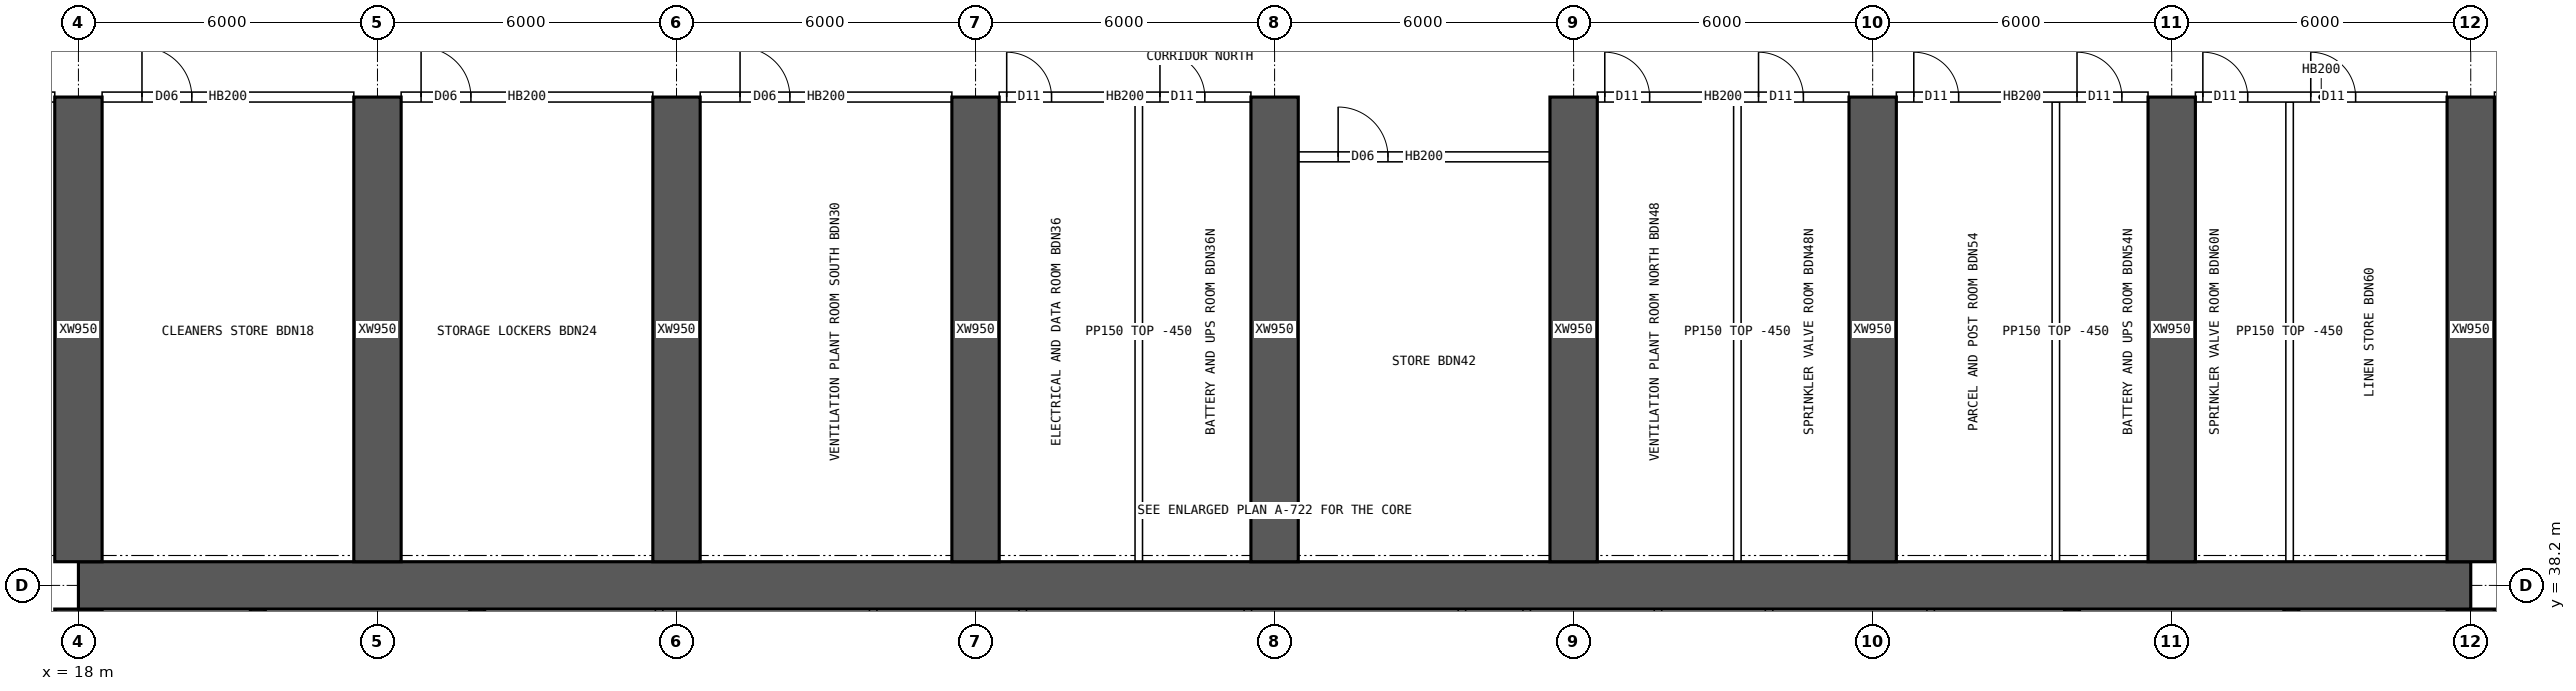
"""IFC4 building model, lengths in metres.
Left out: names, types, materials, properties, quantities, classifications, styles, units other than length and angle.
Written with IfcOpenShell. Run it as: python <this file> out.ifc"""

import sys

from ifc_helpers import new_model, si_unit, direction, frame, frame_2d, origin, place, context, subcontext, project, spatial, rectangle, extrude, element, fill, save


model = new_model("IFC4")
c1 = context("Model", 3, precision=1e-05, world=origin(), true_north=direction((0.0, 1.0)))
c2 = subcontext(c1, "Body", "Model", "MODEL_VIEW")
j1 = project(units=[si_unit("LENGTHUNIT", "METRE"), si_unit("PLANEANGLEUNIT", "RADIAN")], contexts=[c1])
p1 = place(None, origin())
s1 = spatial("IfcSite", under=j1, at=p1, CompositionType="ELEMENT")
p2 = place(p1, origin())
s2 = spatial("IfcBuilding", under=s1, at=p2, CompositionType="ELEMENT")
p3 = place(p2, frame((0.0, 0.0, 80.65)))
s3 = spatial("IfcBuildingStorey", under=s2, at=p3, CompositionType="ELEMENT", Elevation=80.65)
p4 = place(p3, frame((18.0, 38.2, 0.0), z_axis=(0.0, 0.0, 1.0), x_axis=(1.0, 0.0, 0.0)))
e1 = element("IfcWall", 1, at=p4, inside=s3, PredefinedType="SHEAR", context=c2, shape_type="SweptSolid", body=[
    extrude(rectangle(XDim=48.0, YDim=0.95, at=frame_2d((24.0, 0.0))), origin(), (0.0, 0.0, 1.0), 3.75),
])
p5 = place(p3, frame((18.0, 26.275, 0.0), z_axis=(0.0, 0.0, 1.0), x_axis=(0.0, 1.0, 0.0)))
e2 = element("IfcWall", 2, at=p5, inside=s3, PredefinedType="SHEAR", context=c2, shape_type="SweptSolid", body=[
    extrude(rectangle(XDim=11.45, YDim=0.95, at=frame_2d((5.725, 0.0))), origin(), (0.0, 0.0, 1.0), 3.75),
])
p6 = place(p5, frame((5.025, 0.0, 0.0)))
e3 = element("IfcOpeningElement", 3, at=p6, cuts=e2, PredefinedType="OPENING", context=c2, shape_type="SweptSolid", body=[
    extrude(rectangle(XDim=1.2, YDim=2.1, at=frame_2d((0.6, 1.05))), frame((0.0, 0.485, 0.0), z_axis=(0.0, -1.0, 0.0), x_axis=(1.0, 0.0, 0.0)), (0.0, 0.0, 1.0), 0.97),
])
p7 = place(p3, frame((66.0, 26.275, 0.0), z_axis=(0.0, 0.0, 1.0), x_axis=(0.0, 1.0, 0.0)))
e4 = element("IfcWall", 4, at=p7, inside=s3, PredefinedType="SHEAR", context=c2, shape_type="SweptSolid", body=[
    extrude(rectangle(XDim=11.45, YDim=0.95, at=frame_2d((5.725, 0.0))), origin(), (0.0, 0.0, 1.0), 3.75),
])
p8 = place(p7, frame((5.025, 0.0, 0.0)))
e5 = element("IfcOpeningElement", 5, at=p8, cuts=e4, PredefinedType="OPENING", context=c2, shape_type="SweptSolid", body=[
    extrude(rectangle(XDim=1.2, YDim=2.1, at=frame_2d((0.6, 1.05))), frame((0.0, 0.485, 0.0), z_axis=(0.0, -1.0, 0.0), x_axis=(1.0, 0.0, 0.0)), (0.0, 0.0, 1.0), 0.97),
])
for number, where, z_axis, x_axis in (
    (6, (21.6, 34.75, 0.0), (0.0, 0.0, 1.0), (0.0, 1.0, 0.0)),
    (7, (62.4, 34.75, 0.0), (0.0, 0.0, 1.0), (0.0, 1.0, 0.0)),
    (8, (26.0, 34.75, 0.0), (0.0, 0.0, 1.0), (0.0, 1.0, 0.0)),
    (9, (58.0, 34.75, 0.0), (0.0, 0.0, 1.0), (0.0, 1.0, 0.0)),
):
    element("IfcWall", number, at=place(p3, frame(where, z_axis=z_axis, x_axis=x_axis)), inside=s3, PredefinedType="SHEAR", context=c2, shape_type="SweptSolid", body=[
        extrude(rectangle(XDim=2.975, YDim=0.3, at=frame_2d((1.488, 0.0))), origin(), (0.0, 0.0, 1.0), 3.75),
    ])
for number, where, z_axis, x_axis in (
    (10, (18.0, 38.675, 0.0), (0.0, 0.0, 1.0), (0.0, 1.0, 0.0)),
    (11, (24.0, 38.675, 0.0), (0.0, 0.0, 1.0), (0.0, 1.0, 0.0)),
    (12, (30.0, 38.675, 0.0), (0.0, 0.0, 1.0), (0.0, 1.0, 0.0)),
    (13, (36.0, 38.675, 0.0), (0.0, 0.0, 1.0), (0.0, 1.0, 0.0)),
    (14, (42.0, 38.675, 0.0), (0.0, 0.0, 1.0), (0.0, 1.0, 0.0)),
    (15, (48.0, 38.675, 0.0), (0.0, 0.0, 1.0), (0.0, 1.0, 0.0)),
    (16, (54.0, 38.675, 0.0), (0.0, 0.0, 1.0), (0.0, 1.0, 0.0)),
    (17, (60.0, 38.675, 0.0), (0.0, 0.0, 1.0), (0.0, 1.0, 0.0)),
    (18, (66.0, 38.675, 0.0), (0.0, 0.0, 1.0), (0.0, 1.0, 0.0)),
):
    element("IfcWall", number, at=place(p3, frame(where, z_axis=z_axis, x_axis=x_axis)), inside=s3, PredefinedType="SHEAR", context=c2, shape_type="SweptSolid", body=[
        extrude(rectangle(XDim=9.325, YDim=0.95, at=frame_2d((4.663, 0.0))), origin(), (0.0, 0.0, 1.0), 3.75),
    ])
for number, where, z_axis, x_axis in (
    (19, (29.651, 34.75, 0.0), (0.0, 0.0, 1.0), (0.0, 1.0, 0.0)),
    (20, (33.946, 34.75, 0.0), (0.0, 0.0, 1.0), (0.0, 1.0, 0.0)),
    (21, (36.946, 34.75, 0.0), (0.0, 0.0, 1.0), (0.0, 1.0, 0.0)),
    (22, (41.463, 34.75, 0.0), (0.0, 0.0, 1.0), (0.0, 1.0, 0.0)),
    (23, (45.758, 34.75, 0.0), (0.0, 0.0, 1.0), (0.0, 1.0, 0.0)),
    (24, (47.058, 34.75, 0.0), (0.0, 0.0, 1.0), (0.0, 1.0, 0.0)),
    (25, (49.692, 34.75, 0.0), (0.0, 0.0, 1.0), (0.0, 1.0, 0.0)),
    (26, (51.921, 34.75, 0.0), (0.0, 0.0, 1.0), (0.0, 1.0, 0.0)),
    (27, (55.163, 34.75, 0.0), (0.0, 0.0, 1.0), (0.0, 1.0, 0.0)),
):
    element("IfcWall", number, at=place(p3, frame(where, z_axis=z_axis, x_axis=x_axis)), inside=s3, PredefinedType="SOLIDWALL", context=c2, shape_type="SweptSolid", body=[
        extrude(rectangle(XDim=2.975, YDim=0.15, at=frame_2d((1.488, 0.0))), origin(), (0.0, 0.0, 1.0), 3.3),
    ])
p9 = place(p3, frame((12.475, 48.0, 0.0), z_axis=(0.0, 0.0, 1.0), x_axis=(1.0, 0.0, 0.0)))
e28 = element("IfcWall", 28, at=p9, inside=s3, PredefinedType="SOLIDWALL", context=c2, shape_type="SweptSolid", body=[
    extrude(rectangle(XDim=5.05, YDim=0.2, at=frame_2d((2.525, 0.0))), origin(), (0.0, 0.0, 1.0), 3.3),
])
p10 = place(p9, frame((3.325, 0.0, 0.0)))
e29 = element("IfcOpeningElement", 29, at=p10, cuts=e28, PredefinedType="OPENING", context=c2, shape_type="SweptSolid", body=[
    extrude(rectangle(XDim=1.6, YDim=2.1, at=frame_2d((0.8, 1.05))), frame((0.0, 0.11, 0.0), z_axis=(0.0, -1.0, 0.0), x_axis=(1.0, 0.0, 0.0)), (0.0, 0.0, 1.0), 0.22),
])
p11 = place(p3, frame((18.475, 48.0, 0.0), z_axis=(0.0, 0.0, 1.0), x_axis=(1.0, 0.0, 0.0)))
e30 = element("IfcWall", 30, at=p11, inside=s3, PredefinedType="SOLIDWALL", context=c2, shape_type="SweptSolid", body=[
    extrude(rectangle(XDim=5.05, YDim=0.2, at=frame_2d((2.525, 0.0))), origin(), (0.0, 0.0, 1.0), 3.3),
])
p12 = place(p11, frame((0.8, 0.0, 0.0)))
e31 = element("IfcOpeningElement", 31, at=p12, cuts=e30, PredefinedType="OPENING", context=c2, shape_type="SweptSolid", body=[
    extrude(rectangle(XDim=1.0, YDim=2.1, at=frame_2d((0.5, 1.05))), frame((0.0, 0.11, 0.0), z_axis=(0.0, -1.0, 0.0), x_axis=(1.0, 0.0, 0.0)), (0.0, 0.0, 1.0), 0.22),
])
p13 = place(p3, frame((24.475, 48.0, 0.0), z_axis=(0.0, 0.0, 1.0), x_axis=(1.0, 0.0, 0.0)))
e32 = element("IfcWall", 32, at=p13, inside=s3, PredefinedType="SOLIDWALL", context=c2, shape_type="SweptSolid", body=[
    extrude(rectangle(XDim=5.05, YDim=0.2, at=frame_2d((2.525, 0.0))), origin(), (0.0, 0.0, 1.0), 3.3),
])
p14 = place(p13, frame((0.4, 0.0, 0.0)))
e33 = element("IfcOpeningElement", 33, at=p14, cuts=e32, PredefinedType="OPENING", context=c2, shape_type="SweptSolid", body=[
    extrude(rectangle(XDim=1.0, YDim=2.1, at=frame_2d((0.5, 1.05))), frame((0.0, 0.11, 0.0), z_axis=(0.0, -1.0, 0.0), x_axis=(1.0, 0.0, 0.0)), (0.0, 0.0, 1.0), 0.22),
])
p15 = place(p3, frame((30.475, 48.0, 0.0), z_axis=(0.0, 0.0, 1.0), x_axis=(1.0, 0.0, 0.0)))
e34 = element("IfcWall", 34, at=p15, inside=s3, PredefinedType="SOLIDWALL", context=c2, shape_type="SweptSolid", body=[
    extrude(rectangle(XDim=5.05, YDim=0.2, at=frame_2d((2.525, 0.0))), origin(), (0.0, 0.0, 1.0), 3.3),
])
p16 = place(p15, frame((0.8, 0.0, 0.0)))
e35 = element("IfcOpeningElement", 35, at=p16, cuts=e34, PredefinedType="OPENING", context=c2, shape_type="SweptSolid", body=[
    extrude(rectangle(XDim=1.0, YDim=2.1, at=frame_2d((0.5, 1.05))), frame((0.0, 0.11, 0.0), z_axis=(0.0, -1.0, 0.0), x_axis=(1.0, 0.0, 0.0)), (0.0, 0.0, 1.0), 0.22),
])
p17 = place(p3, frame((36.475, 48.0, 0.0), z_axis=(0.0, 0.0, 1.0), x_axis=(1.0, 0.0, 0.0)))
e36 = element("IfcWall", 36, at=p17, inside=s3, PredefinedType="SOLIDWALL", context=c2, shape_type="SweptSolid", body=[
    extrude(rectangle(XDim=5.05, YDim=0.2, at=frame_2d((2.525, 0.0))), origin(), (0.0, 0.0, 1.0), 3.3),
])
p18 = place(p17, frame((0.15, 0.0, 0.0)))
e37 = element("IfcOpeningElement", 37, at=p18, cuts=e36, PredefinedType="OPENING", context=c2, shape_type="SweptSolid", body=[
    extrude(rectangle(XDim=0.9, YDim=2.1, at=frame_2d((0.45, 1.05))), frame((0.0, 0.11, 0.0), z_axis=(0.0, -1.0, 0.0), x_axis=(1.0, 0.0, 0.0)), (0.0, 0.0, 1.0), 0.22),
])
p19 = place(p17, frame((3.225, 0.0, 0.0)))
e38 = element("IfcOpeningElement", 38, at=p19, cuts=e36, PredefinedType="OPENING", context=c2, shape_type="SweptSolid", body=[
    extrude(rectangle(XDim=0.9, YDim=2.1, at=frame_2d((0.45, 1.05))), frame((0.0, 0.11, 0.0), z_axis=(0.0, -1.0, 0.0), x_axis=(1.0, 0.0, 0.0)), (0.0, 0.0, 1.0), 0.22),
])
p20 = place(p3, frame((48.475, 48.0, 0.0), z_axis=(0.0, 0.0, 1.0), x_axis=(1.0, 0.0, 0.0)))
e39 = element("IfcWall", 39, at=p20, inside=s3, PredefinedType="SOLIDWALL", context=c2, shape_type="SweptSolid", body=[
    extrude(rectangle(XDim=5.05, YDim=0.2, at=frame_2d((2.525, 0.0))), origin(), (0.0, 0.0, 1.0), 3.3),
])
p21 = place(p20, frame((0.15, 0.0, 0.0)))
e40 = element("IfcOpeningElement", 40, at=p21, cuts=e39, PredefinedType="OPENING", context=c2, shape_type="SweptSolid", body=[
    extrude(rectangle(XDim=0.9, YDim=2.1, at=frame_2d((0.45, 1.05))), frame((0.0, 0.11, 0.0), z_axis=(0.0, -1.0, 0.0), x_axis=(1.0, 0.0, 0.0)), (0.0, 0.0, 1.0), 0.22),
])
p22 = place(p20, frame((3.235, 0.0, 0.0)))
e41 = element("IfcOpeningElement", 41, at=p22, cuts=e39, PredefinedType="OPENING", context=c2, shape_type="SweptSolid", body=[
    extrude(rectangle(XDim=0.9, YDim=2.1, at=frame_2d((0.45, 1.05))), frame((0.0, 0.11, 0.0), z_axis=(0.0, -1.0, 0.0), x_axis=(1.0, 0.0, 0.0)), (0.0, 0.0, 1.0), 0.22),
])
p23 = place(p3, frame((54.475, 48.0, 0.0), z_axis=(0.0, 0.0, 1.0), x_axis=(1.0, 0.0, 0.0)))
e42 = element("IfcWall", 42, at=p23, inside=s3, PredefinedType="SOLIDWALL", context=c2, shape_type="SweptSolid", body=[
    extrude(rectangle(XDim=5.05, YDim=0.2, at=frame_2d((2.525, 0.0))), origin(), (0.0, 0.0, 1.0), 3.3),
])
p24 = place(p23, frame((0.35, 0.0, 0.0)))
e43 = element("IfcOpeningElement", 43, at=p24, cuts=e42, PredefinedType="OPENING", context=c2, shape_type="SweptSolid", body=[
    extrude(rectangle(XDim=0.9, YDim=2.1, at=frame_2d((0.45, 1.05))), frame((0.0, 0.11, 0.0), z_axis=(0.0, -1.0, 0.0), x_axis=(1.0, 0.0, 0.0)), (0.0, 0.0, 1.0), 0.22),
])
p25 = place(p23, frame((3.625, 0.0, 0.0)))
e44 = element("IfcOpeningElement", 44, at=p25, cuts=e42, PredefinedType="OPENING", context=c2, shape_type="SweptSolid", body=[
    extrude(rectangle(XDim=0.9, YDim=2.1, at=frame_2d((0.45, 1.05))), frame((0.0, 0.11, 0.0), z_axis=(0.0, -1.0, 0.0), x_axis=(1.0, 0.0, 0.0)), (0.0, 0.0, 1.0), 0.22),
])
p26 = place(p3, frame((60.475, 48.0, 0.0), z_axis=(0.0, 0.0, 1.0), x_axis=(1.0, 0.0, 0.0)))
e45 = element("IfcWall", 45, at=p26, inside=s3, PredefinedType="SOLIDWALL", context=c2, shape_type="SweptSolid", body=[
    extrude(rectangle(XDim=5.05, YDim=0.2, at=frame_2d((2.525, 0.0))), origin(), (0.0, 0.0, 1.0), 3.3),
])
p27 = place(p26, frame((0.15, 0.0, 0.0)))
e46 = element("IfcOpeningElement", 46, at=p27, cuts=e45, PredefinedType="OPENING", context=c2, shape_type="SweptSolid", body=[
    extrude(rectangle(XDim=0.9, YDim=2.1, at=frame_2d((0.45, 1.05))), frame((0.0, 0.11, 0.0), z_axis=(0.0, -1.0, 0.0), x_axis=(1.0, 0.0, 0.0)), (0.0, 0.0, 1.0), 0.22),
])
p28 = place(p26, frame((2.315, 0.0, 0.0)))
e47 = element("IfcOpeningElement", 47, at=p28, cuts=e45, PredefinedType="OPENING", context=c2, shape_type="SweptSolid", body=[
    extrude(rectangle(XDim=0.9, YDim=2.1, at=frame_2d((0.45, 1.05))), frame((0.0, 0.11, 0.0), z_axis=(0.0, -1.0, 0.0), x_axis=(1.0, 0.0, 0.0)), (0.0, 0.0, 1.0), 0.22),
])
p29 = place(p3, frame((66.475, 48.0, 0.0), z_axis=(0.0, 0.0, 1.0), x_axis=(1.0, 0.0, 0.0)))
e48 = element("IfcWall", 48, at=p29, inside=s3, PredefinedType="SOLIDWALL", context=c2, shape_type="SweptSolid", body=[
    extrude(rectangle(XDim=1.925, YDim=0.2, at=frame_2d((0.962, 0.0))), origin(), (0.0, 0.0, 1.0), 3.3),
])
p30 = place(p29, frame((0.05, 0.0, 0.0)))
e49 = element("IfcOpeningElement", 49, at=p30, cuts=e48, PredefinedType="OPENING", context=c2, shape_type="SweptSolid", body=[
    extrude(rectangle(XDim=1.2, YDim=2.1, at=frame_2d((0.6, 1.05))), frame((0.0, 0.11, 0.0), z_axis=(0.0, -1.0, 0.0), x_axis=(1.0, 0.0, 0.0)), (0.0, 0.0, 1.0), 0.22),
])
p31 = place(p3, frame((39.275, 38.675, 0.0), z_axis=(0.0, 0.0, 1.0), x_axis=(0.0, 1.0, 0.0)))
e50 = element("IfcWall", 50, at=p31, inside=s3, PredefinedType="PARTITIONING", context=c2, shape_type="SweptSolid", body=[
    extrude(rectangle(XDim=9.225, YDim=0.15, at=frame_2d((4.612, 0.0))), origin(), (0.0, 0.0, 1.0), 3.3),
])
p32 = place(p3, frame((42.475, 46.8, 0.0), z_axis=(0.0, 0.0, 1.0), x_axis=(1.0, 0.0, 0.0)))
e51 = element("IfcWall", 51, at=p32, inside=s3, PredefinedType="SOLIDWALL", context=c2, shape_type="SweptSolid", body=[
    extrude(rectangle(XDim=5.05, YDim=0.2, at=frame_2d((2.525, 0.0))), origin(), (0.0, 0.0, 1.0), 3.3),
])
p33 = place(p32, frame((0.8, 0.0, 0.0)))
e52 = element("IfcOpeningElement", 52, at=p33, cuts=e51, PredefinedType="OPENING", context=c2, shape_type="SweptSolid", body=[
    extrude(rectangle(XDim=1.0, YDim=2.1, at=frame_2d((0.5, 1.05))), frame((0.0, 0.11, 0.0), z_axis=(0.0, -1.0, 0.0), x_axis=(1.0, 0.0, 0.0)), (0.0, 0.0, 1.0), 0.22),
])
for number, where, z_axis, x_axis in (
    (53, (51.285, 38.675, 0.0), (0.0, 0.0, 1.0), (0.0, 1.0, 0.0)),
    (54, (57.675, 38.675, 0.0), (0.0, 0.0, 1.0), (0.0, 1.0, 0.0)),
    (55, (62.365, 38.675, 0.0), (0.0, 0.0, 1.0), (0.0, 1.0, 0.0)),
):
    element("IfcWall", number, at=place(p3, frame(where, z_axis=z_axis, x_axis=x_axis)), inside=s3, PredefinedType="PARTITIONING", context=c2, shape_type="SweptSolid", body=[
        extrude(rectangle(XDim=9.225, YDim=0.15, at=frame_2d((4.612, 0.0))), origin(), (0.0, 0.0, 1.0), 3.3),
    ])
p34 = place(p12, origin())
e56 = element("IfcDoor", 56, at=p34, inside=s3, OperationType="SINGLE_SWING_LEFT", PredefinedType="DOOR", context=c2, shape_type="SweptSolid", body=[
    extrude(rectangle(XDim=1.0, YDim=2.1, at=frame_2d((0.5, 1.05))), frame((0.0, 0.025, 0.0), z_axis=(0.0, -1.0, 0.0), x_axis=(1.0, 0.0, 0.0)), (0.0, 0.0, 1.0), 0.05),
])
fill(e31, e56)
p35 = place(p14, origin())
e57 = element("IfcDoor", 57, at=p35, inside=s3, OperationType="SINGLE_SWING_LEFT", PredefinedType="DOOR", context=c2, shape_type="SweptSolid", body=[
    extrude(rectangle(XDim=1.0, YDim=2.1, at=frame_2d((0.5, 1.05))), frame((0.0, 0.025, 0.0), z_axis=(0.0, -1.0, 0.0), x_axis=(1.0, 0.0, 0.0)), (0.0, 0.0, 1.0), 0.05),
])
fill(e33, e57)
p36 = place(p16, origin())
e58 = element("IfcDoor", 58, at=p36, inside=s3, OperationType="SINGLE_SWING_LEFT", PredefinedType="DOOR", context=c2, shape_type="SweptSolid", body=[
    extrude(rectangle(XDim=1.0, YDim=2.1, at=frame_2d((0.5, 1.05))), frame((0.0, 0.025, 0.0), z_axis=(0.0, -1.0, 0.0), x_axis=(1.0, 0.0, 0.0)), (0.0, 0.0, 1.0), 0.05),
])
fill(e35, e58)
p37 = place(p18, origin())
e59 = element("IfcDoor", 59, at=p37, inside=s3, OperationType="SINGLE_SWING_LEFT", PredefinedType="DOOR", context=c2, shape_type="SweptSolid", body=[
    extrude(rectangle(XDim=0.9, YDim=2.1, at=frame_2d((0.45, 1.05))), frame((0.0, 0.025, 0.0), z_axis=(0.0, -1.0, 0.0), x_axis=(1.0, 0.0, 0.0)), (0.0, 0.0, 1.0), 0.05),
])
fill(e37, e59)
p38 = place(p19, origin())
e60 = element("IfcDoor", 60, at=p38, inside=s3, OperationType="SINGLE_SWING_LEFT", PredefinedType="DOOR", context=c2, shape_type="SweptSolid", body=[
    extrude(rectangle(XDim=0.9, YDim=2.1, at=frame_2d((0.45, 1.05))), frame((0.0, 0.025, 0.0), z_axis=(0.0, -1.0, 0.0), x_axis=(1.0, 0.0, 0.0)), (0.0, 0.0, 1.0), 0.05),
])
fill(e38, e60)
p39 = place(p33, origin())
e61 = element("IfcDoor", 61, at=p39, inside=s3, OperationType="SINGLE_SWING_LEFT", PredefinedType="DOOR", context=c2, shape_type="SweptSolid", body=[
    extrude(rectangle(XDim=1.0, YDim=2.1, at=frame_2d((0.5, 1.05))), frame((0.0, 0.025, 0.0), z_axis=(0.0, -1.0, 0.0), x_axis=(1.0, 0.0, 0.0)), (0.0, 0.0, 1.0), 0.05),
])
fill(e52, e61)
p40 = place(p21, origin())
e62 = element("IfcDoor", 62, at=p40, inside=s3, OperationType="SINGLE_SWING_LEFT", PredefinedType="DOOR", context=c2, shape_type="SweptSolid", body=[
    extrude(rectangle(XDim=0.9, YDim=2.1, at=frame_2d((0.45, 1.05))), frame((0.0, 0.025, 0.0), z_axis=(0.0, -1.0, 0.0), x_axis=(1.0, 0.0, 0.0)), (0.0, 0.0, 1.0), 0.05),
])
fill(e40, e62)
p41 = place(p22, origin())
e63 = element("IfcDoor", 63, at=p41, inside=s3, OperationType="SINGLE_SWING_LEFT", PredefinedType="DOOR", context=c2, shape_type="SweptSolid", body=[
    extrude(rectangle(XDim=0.9, YDim=2.1, at=frame_2d((0.45, 1.05))), frame((0.0, 0.025, 0.0), z_axis=(0.0, -1.0, 0.0), x_axis=(1.0, 0.0, 0.0)), (0.0, 0.0, 1.0), 0.05),
])
fill(e41, e63)
p42 = place(p24, origin())
e64 = element("IfcDoor", 64, at=p42, inside=s3, OperationType="SINGLE_SWING_LEFT", PredefinedType="DOOR", context=c2, shape_type="SweptSolid", body=[
    extrude(rectangle(XDim=0.9, YDim=2.1, at=frame_2d((0.45, 1.05))), frame((0.0, 0.025, 0.0), z_axis=(0.0, -1.0, 0.0), x_axis=(1.0, 0.0, 0.0)), (0.0, 0.0, 1.0), 0.05),
])
fill(e43, e64)
p43 = place(p25, origin())
e65 = element("IfcDoor", 65, at=p43, inside=s3, OperationType="SINGLE_SWING_LEFT", PredefinedType="DOOR", context=c2, shape_type="SweptSolid", body=[
    extrude(rectangle(XDim=0.9, YDim=2.1, at=frame_2d((0.45, 1.05))), frame((0.0, 0.025, 0.0), z_axis=(0.0, -1.0, 0.0), x_axis=(1.0, 0.0, 0.0)), (0.0, 0.0, 1.0), 0.05),
])
fill(e44, e65)
p44 = place(p27, origin())
e66 = element("IfcDoor", 66, at=p44, inside=s3, OperationType="SINGLE_SWING_LEFT", PredefinedType="DOOR", context=c2, shape_type="SweptSolid", body=[
    extrude(rectangle(XDim=0.9, YDim=2.1, at=frame_2d((0.45, 1.05))), frame((0.0, 0.025, 0.0), z_axis=(0.0, -1.0, 0.0), x_axis=(1.0, 0.0, 0.0)), (0.0, 0.0, 1.0), 0.05),
])
fill(e46, e66)
p45 = place(p28, origin())
e67 = element("IfcDoor", 67, at=p45, inside=s3, OperationType="SINGLE_SWING_LEFT", PredefinedType="DOOR", context=c2, shape_type="SweptSolid", body=[
    extrude(rectangle(XDim=0.9, YDim=2.1, at=frame_2d((0.45, 1.05))), frame((0.0, 0.025, 0.0), z_axis=(0.0, -1.0, 0.0), x_axis=(1.0, 0.0, 0.0)), (0.0, 0.0, 1.0), 0.05),
])
fill(e47, e67)
save(model, sys.argv[1])
